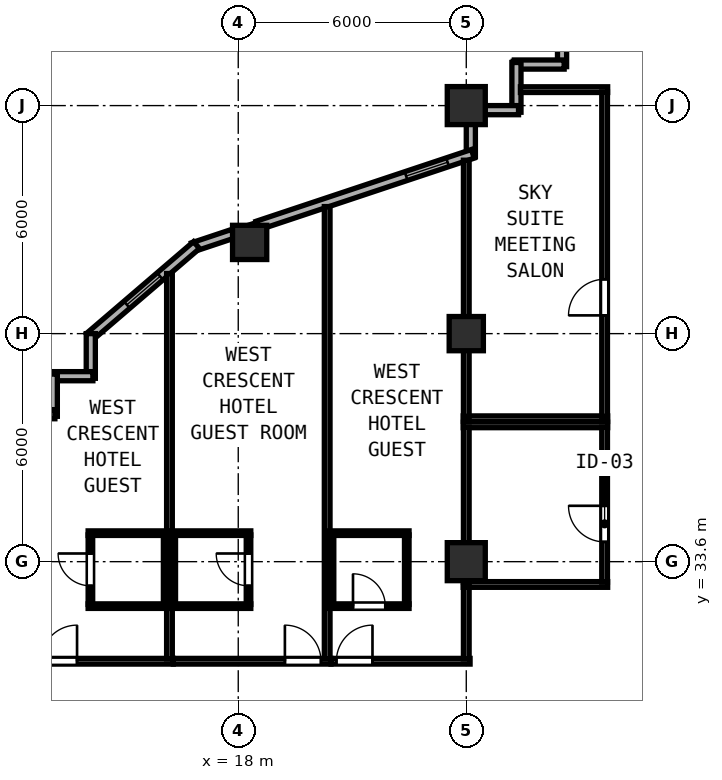
"""IFC4 building model, lengths in metres.
Left out: names, types, materials, properties, quantities, classifications, styles, units other than length and angle.
Written with IfcOpenShell. Run it as: python <this file> out.ifc"""

import sys

from ifc_helpers import new_model, si_unit, direction, frame, frame_2d, origin, origin_2d, place, context, subcontext, project, spatial, rectangle, hollow_rectangle, extrude, element, fill, save


model = new_model("IFC4")
c1 = context("Model", 3, precision=1e-05, world=origin(), true_north=direction((0.0, 1.0)))
c2 = subcontext(c1, "Body", "Model", "MODEL_VIEW")
j1 = project(units=[si_unit("LENGTHUNIT", "METRE"), si_unit("PLANEANGLEUNIT", "RADIAN")], contexts=[c1])
p1 = place(None, origin())
s1 = spatial("IfcSite", under=j1, at=p1, CompositionType="ELEMENT")
p2 = place(p1, origin())
s2 = spatial("IfcBuilding", under=s1, at=p2, CompositionType="ELEMENT")
p3 = place(p2, frame((0.0, 0.0, 152.4)))
s3 = spatial("IfcBuildingStorey", under=s2, at=p3, CompositionType="ELEMENT", Elevation=152.4)
for number, where, z_axis, x_axis in (
    (1, (24.0, 33.6, 0.0), (0.0, 0.0, 1.0), (1.0, 0.0, 0.0)),
    (2, (24.0, 45.6, 0.0), (0.0, 0.0, 1.0), (1.0, 0.0, 0.0)),
):
    element("IfcColumn", number, at=place(p3, frame(where, z_axis=z_axis, x_axis=x_axis)), inside=s3, PredefinedType="COLUMN", context=c2, shape_type="SweptSolid", body=[
        extrude(hollow_rectangle(XDim=1.0, YDim=1.0, WallThickness=0.038, at=origin_2d()), origin(), (0.0, 0.0, 1.0), 3.8),
    ])
for number, where, z_axis, x_axis in (
    (3, (24.0, 39.6, 0.0), (0.0, 0.0, 1.0), (1.0, 0.0, 0.0)),
    (4, (18.3, 42.0, 0.0), (0.0, 0.0, 1.0), (1.0, 0.0, 0.0)),
):
    element("IfcColumn", number, at=place(p3, frame(where, z_axis=z_axis, x_axis=x_axis)), inside=s3, PredefinedType="COLUMN", context=c2, shape_type="SweptSolid", body=[
        extrude(hollow_rectangle(XDim=0.9, YDim=0.9, WallThickness=0.034, at=origin_2d()), origin(), (0.0, 0.0, 1.0), 3.8),
    ])
p4 = place(p3, frame((26.52, 47.995, 0.0), z_axis=(0.0, 0.0, 1.0), x_axis=(0.0, -1.0, 0.0)))
e5 = element("IfcWall", 5, at=p4, inside=s3, PredefinedType="SOLIDWALL", context=c2, shape_type="SweptSolid", body=[
    extrude(rectangle(XDim=1.37, YDim=0.24, at=frame_2d((0.685, 0.0))), origin(), (0.0, 0.0, 1.0), 3.6),
])
for number, where, z_axis, x_axis in (
    (6, (26.575, 46.68, 0.0), (0.0, 0.0, 1.0), (-1.0, 0.0, 0.0)),
    (7, (25.32, 46.735, 0.0), (0.0, 0.0, 1.0), (0.0, -1.0, 0.0)),
):
    element("IfcWall", number, at=place(p3, frame(where, z_axis=z_axis, x_axis=x_axis)), inside=s3, PredefinedType="SOLIDWALL", context=c2, shape_type="SweptSolid", body=[
        extrude(rectangle(XDim=1.31, YDim=0.24, at=frame_2d((0.655, 0.0))), origin(), (0.0, 0.0, 1.0), 3.6),
    ])
p5 = place(p3, frame((25.375, 45.48, 0.0), z_axis=(0.0, 0.0, 1.0), x_axis=(-1.0, 0.0, 0.0)))
e8 = element("IfcWall", 8, at=p5, inside=s3, PredefinedType="SOLIDWALL", context=c2, shape_type="SweptSolid", body=[
    extrude(rectangle(XDim=0.883, YDim=0.24, at=frame_2d((0.441, 0.0))), origin(), (0.0, 0.0, 1.0), 3.6),
])
p6 = place(p3, frame((24.12, 45.108, 0.0), z_axis=(0.0, 0.0, 1.0), x_axis=(0.0, -1.0, 0.0)))
e9 = element("IfcWall", 9, at=p6, inside=s3, PredefinedType="SOLIDWALL", context=c2, shape_type="SweptSolid", body=[
    extrude(rectangle(XDim=0.849, YDim=0.24, at=frame_2d((0.425, 0.0))), origin(), (0.0, 0.0, 1.0), 3.145),
])
p7 = place(p3, frame((24.172, 44.331, 0.0), z_axis=(0.0, 0.0, 1.0), x_axis=(-0.948683298051, -0.316227766017, 0.0)))
e10 = element("IfcWall", 10, at=p7, inside=s3, PredefinedType="SOLIDWALL", context=c2, shape_type="SweptSolid", body=[
    extrude(rectangle(XDim=5.973, YDim=0.24, at=frame_2d((2.987, 0.0))), origin(), (0.0, 0.0, 1.0), 3.145),
])
p8 = place(p7, frame((0.7, 0.0, 0.85)))
e11 = element("IfcOpeningElement", 11, at=p8, cuts=e10, PredefinedType="OPENING", context=c2, shape_type="SweptSolid", body=[
    extrude(rectangle(XDim=1.15, YDim=1.8, at=frame_2d((0.575, 0.9))), frame((0.0, 0.13, 0.0), z_axis=(0.0, -1.0, 0.0), x_axis=(1.0, 0.0, 0.0)), (0.0, 0.0, 1.0), 0.26),
])
p9 = place(p3, frame((17.858, 42.226, 0.0), z_axis=(0.0, 0.0, 1.0), x_axis=(-0.948639166064, -0.316360131194, 0.0)))
e12 = element("IfcWall", 12, at=p9, inside=s3, PredefinedType="SOLIDWALL", context=c2, shape_type="SweptSolid", body=[
    extrude(rectangle(XDim=1.107, YDim=0.24, at=frame_2d((0.553, 0.0))), origin(), (0.0, 0.0, 1.0), 3.6),
])
p10 = place(p3, frame((16.902, 41.929, 0.0), z_axis=(0.0, 0.0, 1.0), x_axis=(-0.759275136126, -0.650769750112, 0.0)))
e13 = element("IfcWall", 13, at=p10, inside=s3, PredefinedType="SOLIDWALL", context=c2, shape_type="SweptSolid", body=[
    extrude(rectangle(XDim=3.719, YDim=0.24, at=frame_2d((1.86, 0.0))), origin(), (0.0, 0.0, 1.0), 3.6),
])
p11 = place(p10, frame((1.263, 0.0, 0.85)))
e14 = element("IfcOpeningElement", 14, at=p11, cuts=e13, PredefinedType="OPENING", context=c2, shape_type="SweptSolid", body=[
    extrude(rectangle(XDim=1.15, YDim=1.8, at=frame_2d((0.575, 0.9))), frame((0.0, 0.13, 0.0), z_axis=(0.0, -1.0, 0.0), x_axis=(1.0, 0.0, 0.0)), (0.0, 0.0, 1.0), 0.26),
])
p12 = place(p3, frame((14.12, 39.6, 0.0), z_axis=(0.0, 0.0, 1.0), x_axis=(0.0, -1.0, 0.0)))
e15 = element("IfcWall", 15, at=p12, inside=s3, PredefinedType="SOLIDWALL", context=c2, shape_type="SweptSolid", body=[
    extrude(rectangle(XDim=1.175, YDim=0.24, at=frame_2d((0.587, 0.0))), origin(), (0.0, 0.0, 1.0), 3.6),
])
p13 = place(p3, frame((14.175, 38.48, 0.0), z_axis=(0.0, 0.0, 1.0), x_axis=(-1.0, 0.0, 0.0)))
e16 = element("IfcWall", 16, at=p13, inside=s3, PredefinedType="SOLIDWALL", context=c2, shape_type="SweptSolid", body=[
    extrude(rectangle(XDim=1.11, YDim=0.24, at=frame_2d((0.555, 0.0))), origin(), (0.0, 0.0, 1.0), 3.6),
])
p14 = place(p3, frame((13.12, 38.535, 0.0), z_axis=(0.0, 0.0, 1.0), x_axis=(0.0, -1.0, 0.0)))
e17 = element("IfcWall", 17, at=p14, inside=s3, PredefinedType="SOLIDWALL", context=c2, shape_type="SweptSolid", body=[
    extrude(rectangle(XDim=1.11, YDim=0.24, at=frame_2d((0.555, 0.0))), origin(), (0.0, 0.0, 1.0), 3.6),
])
p15 = place(p3, frame((13.175, 37.48, 0.0), z_axis=(0.0, 0.0, 1.0), x_axis=(-1.0, 0.0, 0.0)))
e18 = element("IfcWall", 18, at=p15, inside=s3, PredefinedType="SOLIDWALL", context=c2, shape_type="SweptSolid", body=[
    extrude(rectangle(XDim=1.11, YDim=0.24, at=frame_2d((0.555, 0.0))), origin(), (0.0, 0.0, 1.0), 3.6),
])
for number, where, z_axis, x_axis in (
    (19, (23.92, 37.2, 0.0), (0.0, 0.0, 1.0), (1.0, 0.0, 0.0)),
    (20, (23.92, 33.0, 0.0), (0.0, 0.0, 1.0), (1.0, 0.0, 0.0)),
):
    element("IfcWall", number, at=place(p3, frame(where, z_axis=z_axis, x_axis=x_axis)), inside=s3, PredefinedType="PARTITIONING", context=c2, shape_type="SweptSolid", body=[
        extrude(rectangle(XDim=3.8, YDim=0.15, at=frame_2d((1.9, 0.0))), origin(), (0.0, 0.0, 1.0), 3.6),
    ])
p16 = place(p3, frame((24.0, 33.06, 0.0), z_axis=(0.0, 0.0, 1.0), x_axis=(0.0, 1.0, 0.0)))
e21 = element("IfcWall", 21, at=p16, inside=s3, PredefinedType="PARTITIONING", context=c2, shape_type="SweptSolid", body=[
    extrude(rectangle(XDim=4.08, YDim=0.15, at=frame_2d((2.04, 0.0))), origin(), (0.0, 0.0, 1.0), 3.145),
])
p17 = place(p3, frame((27.64, 33.06, 0.0), z_axis=(0.0, 0.0, 1.0), x_axis=(0.0, 1.0, 0.0)))
e22 = element("IfcWall", 22, at=p17, inside=s3, PredefinedType="PARTITIONING", context=c2, shape_type="SweptSolid", body=[
    extrude(rectangle(XDim=4.08, YDim=0.15, at=frame_2d((2.04, 0.0))), origin(), (0.0, 0.0, 1.0), 3.6),
])
p18 = place(p17, frame((2.01, 0.0, 0.0), z_axis=(0.0, 0.0, 1.0), x_axis=(-1.0, 0.0, 0.0)))
e23 = element("IfcOpeningElement", 23, at=p18, cuts=e22, PredefinedType="OPENING", context=c2, shape_type="SweptSolid", body=[
    extrude(rectangle(XDim=0.95, YDim=2.12, at=frame_2d((0.475, 1.06))), frame((0.0, 0.085, 0.0), z_axis=(0.0, -1.0, 0.0), x_axis=(1.0, 0.0, 0.0)), (0.0, 0.0, 1.0), 0.17),
])
p19 = place(p3, frame((25.425, 46.02, 0.0), z_axis=(0.0, 0.0, 1.0), x_axis=(1.0, 0.0, 0.0)))
e24 = element("IfcWall", 24, at=p19, inside=s3, PredefinedType="PARTITIONING", context=c2, shape_type="SweptSolid", body=[
    extrude(rectangle(XDim=2.295, YDim=0.15, at=frame_2d((1.147, 0.0))), origin(), (0.0, 0.0, 1.0), 3.6),
])
p20 = place(p3, frame((23.92, 37.36, 0.0), z_axis=(0.0, 0.0, 1.0), x_axis=(1.0, 0.0, 0.0)))
e25 = element("IfcWall", 25, at=p20, inside=s3, PredefinedType="PARTITIONING", context=c2, shape_type="SweptSolid", body=[
    extrude(rectangle(XDim=3.8, YDim=0.15, at=frame_2d((1.9, 0.0))), origin(), (0.0, 0.0, 1.0), 3.6),
])
p21 = place(p3, frame((24.0, 37.42, 0.0), z_axis=(0.0, 0.0, 1.0), x_axis=(0.0, 1.0, 0.0)))
e26 = element("IfcWall", 26, at=p21, inside=s3, PredefinedType="PARTITIONING", context=c2, shape_type="SweptSolid", body=[
    extrude(rectangle(XDim=6.743, YDim=0.15, at=frame_2d((3.372, 0.0))), origin(), (0.0, 0.0, 1.0), 3.145),
])
p22 = place(p3, frame((27.64, 37.42, 0.0), z_axis=(0.0, 0.0, 1.0), x_axis=(0.0, 1.0, 0.0)))
e27 = element("IfcWall", 27, at=p22, inside=s3, PredefinedType="PARTITIONING", context=c2, shape_type="SweptSolid", body=[
    extrude(rectangle(XDim=8.54, YDim=0.15, at=frame_2d((4.27, 0.0))), origin(), (0.0, 0.0, 1.0), 3.6),
])
p23 = place(p22, frame((3.61, 0.0, 0.0), z_axis=(0.0, 0.0, 1.0), x_axis=(-1.0, 0.0, 0.0)))
e28 = element("IfcOpeningElement", 28, at=p23, cuts=e27, PredefinedType="OPENING", context=c2, shape_type="SweptSolid", body=[
    extrude(rectangle(XDim=0.95, YDim=2.12, at=frame_2d((0.475, 1.06))), frame((0.0, 0.085, 0.0), z_axis=(0.0, -1.0, 0.0), x_axis=(1.0, 0.0, 0.0)), (0.0, 0.0, 1.0), 0.17),
])
p24 = place(p3, frame((11.7, 30.98, 0.0), z_axis=(0.0, 0.0, 1.0), x_axis=(1.0, 0.0, 0.0)))
e29 = element("IfcWall", 29, at=p24, inside=s3, PredefinedType="PARTITIONING", context=c2, shape_type="SweptSolid", body=[
    extrude(rectangle(XDim=4.59, YDim=0.15, at=frame_2d((2.295, 0.0))), origin(), (0.0, 0.0, 1.0), 3.6),
])
p25 = place(p24, frame((1.109, 0.0, 0.0)))
e30 = element("IfcOpeningElement", 30, at=p25, cuts=e29, PredefinedType="OPENING", context=c2, shape_type="SweptSolid", body=[
    extrude(rectangle(XDim=0.95, YDim=2.15, at=frame_2d((0.475, 1.075))), frame((0.0, 0.085, 0.0), z_axis=(0.0, -1.0, 0.0), x_axis=(1.0, 0.0, 0.0)), (0.0, 0.0, 1.0), 0.17),
])
p26 = place(p3, frame((16.19, 31.04, 0.0), z_axis=(0.0, 0.0, 1.0), x_axis=(0.0, 1.0, 0.0)))
e31 = element("IfcWall", 31, at=p26, inside=s3, PredefinedType="PARTITIONING", context=c2, shape_type="SweptSolid", body=[
    extrude(rectangle(XDim=10.141, YDim=0.15, at=frame_2d((5.07, 0.0))), origin(), (0.0, 0.0, 1.0), 3.6),
])
for number, where, z_axis, x_axis in (
    (32, (14.05, 34.35, 0.0), (0.0, 0.0, 1.0), (1.0, 0.0, 0.0)),
    (33, (14.05, 32.43, 0.0), (0.0, 0.0, 1.0), (1.0, 0.0, 0.0)),
):
    element("IfcWall", number, at=place(p3, frame(where, z_axis=z_axis, x_axis=x_axis)), inside=s3, PredefinedType="PARTITIONING", context=c2, shape_type="SweptSolid", body=[
        extrude(rectangle(XDim=2.08, YDim=0.12, at=frame_2d((1.04, 0.0))), origin(), (0.0, 0.0, 1.0), 3.6),
    ])
p27 = place(p3, frame((14.11, 32.475, 0.0), z_axis=(0.0, 0.0, 1.0), x_axis=(0.0, 1.0, 0.0)))
e34 = element("IfcWall", 34, at=p27, inside=s3, PredefinedType="PARTITIONING", context=c2, shape_type="SweptSolid", body=[
    extrude(rectangle(XDim=1.83, YDim=0.12, at=frame_2d((0.915, 0.0))), origin(), (0.0, 0.0, 1.0), 3.6),
])
p28 = place(p27, frame((1.34, 0.0, 0.0), z_axis=(0.0, 0.0, 1.0), x_axis=(-1.0, 0.0, 0.0)))
e35 = element("IfcOpeningElement", 35, at=p28, cuts=e34, PredefinedType="OPENING", context=c2, shape_type="SweptSolid", body=[
    extrude(rectangle(XDim=0.85, YDim=2.1, at=frame_2d((0.425, 1.05))), frame((0.0, 0.07, 0.0), z_axis=(0.0, -1.0, 0.0), x_axis=(1.0, 0.0, 0.0)), (0.0, 0.0, 1.0), 0.14),
])
p29 = place(p3, frame((16.09, 32.475, 0.0), z_axis=(0.0, 0.0, 1.0), x_axis=(0.0, 1.0, 0.0)))
e36 = element("IfcWall", 36, at=p29, inside=s3, PredefinedType="PARTITIONING", context=c2, shape_type="SweptSolid", body=[
    extrude(rectangle(XDim=1.83, YDim=0.12, at=frame_2d((0.915, 0.0))), origin(), (0.0, 0.0, 1.0), 3.6),
])
p30 = place(p3, frame((16.292, 30.98, 0.0), z_axis=(0.0, 0.0, 1.0), x_axis=(1.0, 0.0, 0.0)))
e37 = element("IfcWall", 37, at=p30, inside=s3, PredefinedType="PARTITIONING", context=c2, shape_type="SweptSolid", body=[
    extrude(rectangle(XDim=4.148, YDim=0.15, at=frame_2d((2.074, 0.0))), origin(), (0.0, 0.0, 1.0), 3.6),
])
p31 = place(p30, frame((2.935, 0.0, 0.0)))
e38 = element("IfcOpeningElement", 38, at=p31, cuts=e37, PredefinedType="OPENING", context=c2, shape_type="SweptSolid", body=[
    extrude(rectangle(XDim=0.95, YDim=2.15, at=frame_2d((0.475, 1.075))), frame((0.0, 0.085, 0.0), z_axis=(0.0, -1.0, 0.0), x_axis=(1.0, 0.0, 0.0)), (0.0, 0.0, 1.0), 0.17),
])
p32 = place(p3, frame((20.34, 31.04, 0.0), z_axis=(0.0, 0.0, 1.0), x_axis=(0.0, 1.0, 0.0)))
e39 = element("IfcWall", 39, at=p32, inside=s3, PredefinedType="PARTITIONING", context=c2, shape_type="SweptSolid", body=[
    extrude(rectangle(XDim=11.903, YDim=0.15, at=frame_2d((5.951, 0.0))), origin(), (0.0, 0.0, 1.0), 3.6),
])
for number, where, z_axis, x_axis in (
    (40, (16.25, 34.35, 0.0), (0.0, 0.0, 1.0), (1.0, 0.0, 0.0)),
    (41, (16.25, 32.43, 0.0), (0.0, 0.0, 1.0), (1.0, 0.0, 0.0)),
):
    element("IfcWall", number, at=place(p3, frame(where, z_axis=z_axis, x_axis=x_axis)), inside=s3, PredefinedType="PARTITIONING", context=c2, shape_type="SweptSolid", body=[
        extrude(rectangle(XDim=2.08, YDim=0.12, at=frame_2d((1.04, 0.0))), origin(), (0.0, 0.0, 1.0), 3.6),
    ])
p33 = place(p3, frame((16.29, 32.475, 0.0), z_axis=(0.0, 0.0, 1.0), x_axis=(0.0, 1.0, 0.0)))
e42 = element("IfcWall", 42, at=p33, inside=s3, PredefinedType="PARTITIONING", context=c2, shape_type="SweptSolid", body=[
    extrude(rectangle(XDim=1.83, YDim=0.12, at=frame_2d((0.915, 0.0))), origin(), (0.0, 0.0, 1.0), 3.6),
])
p34 = place(p3, frame((18.27, 32.475, 0.0), z_axis=(0.0, 0.0, 1.0), x_axis=(0.0, 1.0, 0.0)))
e43 = element("IfcWall", 43, at=p34, inside=s3, PredefinedType="PARTITIONING", context=c2, shape_type="SweptSolid", body=[
    extrude(rectangle(XDim=1.83, YDim=0.12, at=frame_2d((0.915, 0.0))), origin(), (0.0, 0.0, 1.0), 3.6),
])
p35 = place(p34, frame((0.49, 0.0, 0.0)))
e44 = element("IfcOpeningElement", 44, at=p35, cuts=e43, PredefinedType="OPENING", context=c2, shape_type="SweptSolid", body=[
    extrude(rectangle(XDim=0.85, YDim=2.1, at=frame_2d((0.425, 1.05))), frame((0.0, 0.07, 0.0), z_axis=(0.0, -1.0, 0.0), x_axis=(1.0, 0.0, 0.0)), (0.0, 0.0, 1.0), 0.14),
])
p36 = place(p3, frame((20.442, 30.98, 0.0), z_axis=(0.0, 0.0, 1.0), x_axis=(1.0, 0.0, 0.0)))
e45 = element("IfcWall", 45, at=p36, inside=s3, PredefinedType="PARTITIONING", context=c2, shape_type="SweptSolid", body=[
    extrude(rectangle(XDim=3.658, YDim=0.15, at=frame_2d((1.829, 0.0))), origin(), (0.0, 0.0, 1.0), 3.6),
])
p37 = place(p36, frame((0.14, 0.0, 0.0)))
e46 = element("IfcOpeningElement", 46, at=p37, cuts=e45, PredefinedType="OPENING", context=c2, shape_type="SweptSolid", body=[
    extrude(rectangle(XDim=0.95, YDim=2.15, at=frame_2d((0.475, 1.075))), frame((0.0, 0.085, 0.0), z_axis=(0.0, -1.0, 0.0), x_axis=(1.0, 0.0, 0.0)), (0.0, 0.0, 1.0), 0.17),
])
p38 = place(p3, frame((24.0, 31.04, 0.0), z_axis=(0.0, 0.0, 1.0), x_axis=(0.0, 1.0, 0.0)))
e47 = element("IfcWall", 47, at=p38, inside=s3, PredefinedType="PARTITIONING", context=c2, shape_type="SweptSolid", body=[
    extrude(rectangle(XDim=1.9, YDim=0.15, at=frame_2d((0.95, 0.0))), origin(), (0.0, 0.0, 1.0), 3.145),
])
p39 = place(p3, frame((20.4, 34.35, 0.0), z_axis=(0.0, 0.0, 1.0), x_axis=(1.0, 0.0, 0.0)))
e48 = element("IfcWall", 48, at=p39, inside=s3, PredefinedType="PARTITIONING", context=c2, shape_type="SweptSolid", body=[
    extrude(rectangle(XDim=2.094, YDim=0.12, at=frame_2d((1.047, 0.0))), origin(), (0.0, 0.0, 1.0), 3.6),
])
p40 = place(p3, frame((20.4, 32.43, 0.0), z_axis=(0.0, 0.0, 1.0), x_axis=(1.0, 0.0, 0.0)))
e49 = element("IfcWall", 49, at=p40, inside=s3, PredefinedType="PARTITIONING", context=c2, shape_type="SweptSolid", body=[
    extrude(rectangle(XDim=2.094, YDim=0.12, at=frame_2d((1.047, 0.0))), origin(), (0.0, 0.0, 1.0), 3.6),
])
p41 = place(p40, frame((0.619, 0.0, 0.0)))
e50 = element("IfcOpeningElement", 50, at=p41, cuts=e49, PredefinedType="OPENING", context=c2, shape_type="SweptSolid", body=[
    extrude(rectangle(XDim=0.85, YDim=2.1, at=frame_2d((0.425, 1.05))), frame((0.0, 0.07, 0.0), z_axis=(0.0, -1.0, 0.0), x_axis=(1.0, 0.0, 0.0)), (0.0, 0.0, 1.0), 0.14),
])
for number, where, z_axis, x_axis in (
    (51, (20.454, 32.475, 0.0), (0.0, 0.0, 1.0), (0.0, 1.0, 0.0)),
    (52, (22.434, 32.475, 0.0), (0.0, 0.0, 1.0), (0.0, 1.0, 0.0)),
):
    element("IfcWall", number, at=place(p3, frame(where, z_axis=z_axis, x_axis=x_axis)), inside=s3, PredefinedType="PARTITIONING", context=c2, shape_type="SweptSolid", body=[
        extrude(rectangle(XDim=1.83, YDim=0.12, at=frame_2d((0.915, 0.0))), origin(), (0.0, 0.0, 1.0), 3.6),
    ])
p42 = place(p8, origin())
e53 = element("IfcWindow", 53, at=p42, inside=s3, PartitioningType="SINGLE_PANEL", PredefinedType="WINDOW", context=c2, shape_type="SweptSolid", body=[
    extrude(rectangle(XDim=1.15, YDim=1.8, at=frame_2d((0.575, 0.9))), frame((0.0, 0.03, 0.0), z_axis=(0.0, -1.0, 0.0), x_axis=(1.0, 0.0, 0.0)), (0.0, 0.0, 1.0), 0.06),
])
fill(e11, e53)
p43 = place(p11, origin())
e54 = element("IfcWindow", 54, at=p43, inside=s3, PartitioningType="SINGLE_PANEL", PredefinedType="WINDOW", context=c2, shape_type="SweptSolid", body=[
    extrude(rectangle(XDim=1.15, YDim=1.8, at=frame_2d((0.575, 0.9))), frame((0.0, 0.03, 0.0), z_axis=(0.0, -1.0, 0.0), x_axis=(1.0, 0.0, 0.0)), (0.0, 0.0, 1.0), 0.06),
])
fill(e14, e54)
p44 = place(p18, origin())
e55 = element("IfcDoor", 55, at=p44, inside=s3, OperationType="SINGLE_SWING_LEFT", PredefinedType="DOOR", context=c2, shape_type="SweptSolid", body=[
    extrude(rectangle(XDim=0.95, YDim=2.12, at=frame_2d((0.475, 1.06))), frame((0.0, 0.025, 0.0), z_axis=(0.0, -1.0, 0.0), x_axis=(1.0, 0.0, 0.0)), (0.0, 0.0, 1.0), 0.05),
])
fill(e23, e55)
p45 = place(p23, origin())
e56 = element("IfcDoor", 56, at=p45, inside=s3, OperationType="SINGLE_SWING_RIGHT", PredefinedType="DOOR", context=c2, shape_type="SweptSolid", body=[
    extrude(rectangle(XDim=0.95, YDim=2.12, at=frame_2d((0.475, 1.06))), frame((0.0, 0.025, 0.0), z_axis=(0.0, -1.0, 0.0), x_axis=(1.0, 0.0, 0.0)), (0.0, 0.0, 1.0), 0.05),
])
fill(e28, e56)
p46 = place(p25, origin())
e57 = element("IfcDoor", 57, at=p46, inside=s3, OperationType="SINGLE_SWING_RIGHT", PredefinedType="DOOR", context=c2, shape_type="SweptSolid", body=[
    extrude(rectangle(XDim=0.95, YDim=2.15, at=frame_2d((0.475, 1.075))), frame((0.0, 0.025, 0.0), z_axis=(0.0, -1.0, 0.0), x_axis=(1.0, 0.0, 0.0)), (0.0, 0.0, 1.0), 0.05),
])
fill(e30, e57)
p47 = place(p28, origin())
e58 = element("IfcDoor", 58, at=p47, inside=s3, OperationType="SINGLE_SWING_LEFT", PredefinedType="DOOR", context=c2, shape_type="SweptSolid", body=[
    extrude(rectangle(XDim=0.85, YDim=2.1, at=frame_2d((0.425, 1.05))), frame((0.0, 0.025, 0.0), z_axis=(0.0, -1.0, 0.0), x_axis=(1.0, 0.0, 0.0)), (0.0, 0.0, 1.0), 0.05),
])
fill(e35, e58)
p48 = place(p31, origin())
e59 = element("IfcDoor", 59, at=p48, inside=s3, OperationType="SINGLE_SWING_LEFT", PredefinedType="DOOR", context=c2, shape_type="SweptSolid", body=[
    extrude(rectangle(XDim=0.95, YDim=2.15, at=frame_2d((0.475, 1.075))), frame((0.0, 0.025, 0.0), z_axis=(0.0, -1.0, 0.0), x_axis=(1.0, 0.0, 0.0)), (0.0, 0.0, 1.0), 0.05),
])
fill(e38, e59)
p49 = place(p35, origin())
e60 = element("IfcDoor", 60, at=p49, inside=s3, OperationType="SINGLE_SWING_RIGHT", PredefinedType="DOOR", context=c2, shape_type="SweptSolid", body=[
    extrude(rectangle(XDim=0.85, YDim=2.1, at=frame_2d((0.425, 1.05))), frame((0.0, 0.025, 0.0), z_axis=(0.0, -1.0, 0.0), x_axis=(1.0, 0.0, 0.0)), (0.0, 0.0, 1.0), 0.05),
])
fill(e44, e60)
p50 = place(p37, origin())
e61 = element("IfcDoor", 61, at=p50, inside=s3, OperationType="SINGLE_SWING_RIGHT", PredefinedType="DOOR", context=c2, shape_type="SweptSolid", body=[
    extrude(rectangle(XDim=0.95, YDim=2.15, at=frame_2d((0.475, 1.075))), frame((0.0, 0.025, 0.0), z_axis=(0.0, -1.0, 0.0), x_axis=(1.0, 0.0, 0.0)), (0.0, 0.0, 1.0), 0.05),
])
fill(e46, e61)
p51 = place(p41, origin())
e62 = element("IfcDoor", 62, at=p51, inside=s3, OperationType="SINGLE_SWING_LEFT", PredefinedType="DOOR", context=c2, shape_type="SweptSolid", body=[
    extrude(rectangle(XDim=0.85, YDim=2.1, at=frame_2d((0.425, 1.05))), frame((0.0, 0.025, 0.0), z_axis=(0.0, -1.0, 0.0), x_axis=(1.0, 0.0, 0.0)), (0.0, 0.0, 1.0), 0.05),
])
fill(e50, e62)
save(model, sys.argv[1])
